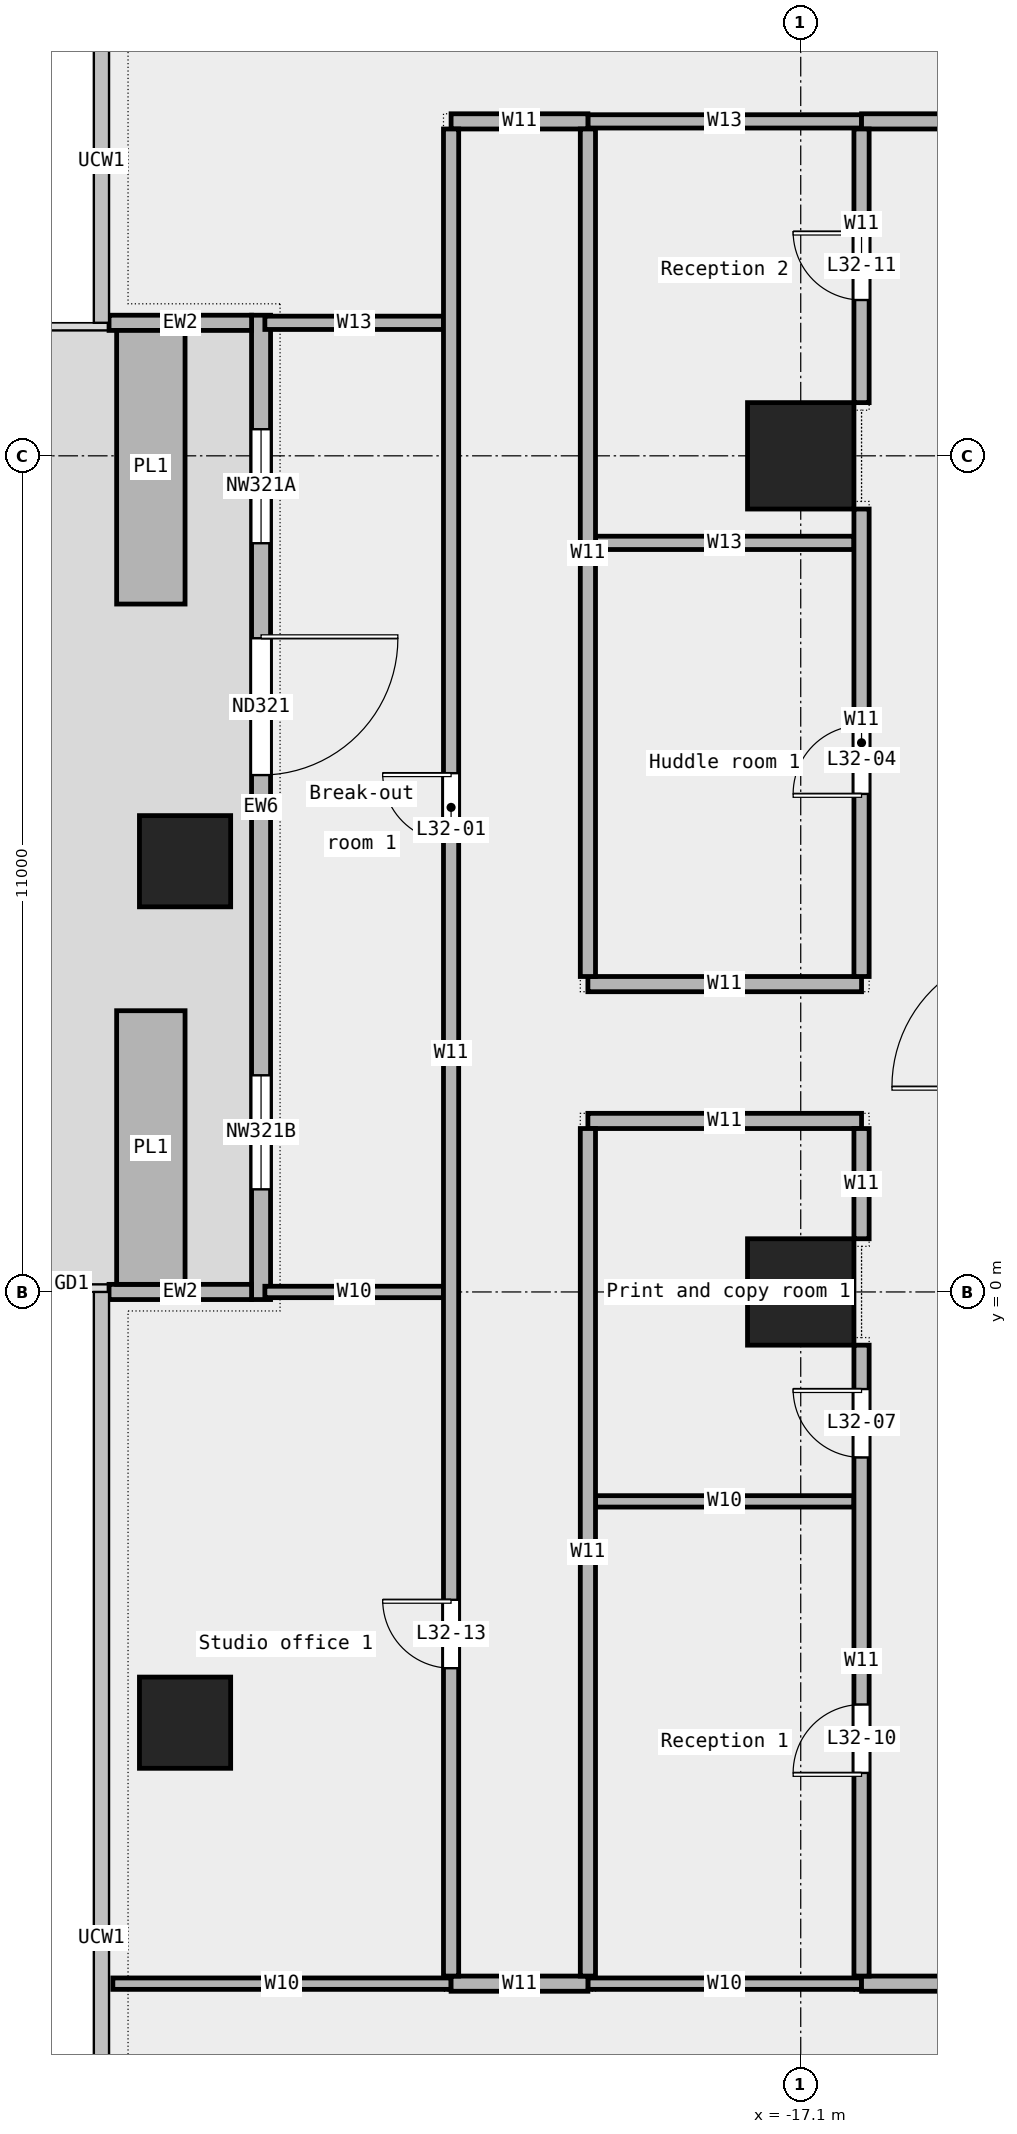
"""IFC4 building model, lengths in metres.
Left out: names, types, materials, properties, quantities, classifications, styles, units other than length and angle.
Written with IfcOpenShell. Run it as: python <this file> out.ifc"""

import sys

from ifc_helpers import new_model, si_unit, direction, frame, frame_2d, origin, origin_2d, place, context, subcontext, project, spatial, rectangle, extrude, element, fill, save


model = new_model("IFC4")
c1 = context("Model", 3, precision=1e-05, world=origin(), true_north=direction((0.0, 1.0)))
c2 = subcontext(c1, "Body", "Model", "MODEL_VIEW")
j1 = project(units=[si_unit("LENGTHUNIT", "METRE"), si_unit("PLANEANGLEUNIT", "RADIAN")], contexts=[c1])
p1 = place(None, origin())
s1 = spatial("IfcSite", under=j1, at=p1, CompositionType="ELEMENT")
p2 = place(p1, origin())
s2 = spatial("IfcBuilding", under=s1, at=p2, CompositionType="ELEMENT")
p3 = place(p2, frame((0.0, 0.0, 161.0)))
s3 = spatial("IfcBuildingStorey", under=s2, at=p3, CompositionType="ELEMENT", Elevation=161.0)
for number, where, z_axis, x_axis in (
    (1, (-25.2, 5.667, 0.0), (0.0, 0.0, 1.0), (1.0, 0.0, 0.0)),
    (2, (-25.2, -5.667, 0.0), (0.0, 0.0, 1.0), (1.0, 0.0, 0.0)),
):
    element("IfcColumn", number, at=place(p3, frame(where, z_axis=z_axis, x_axis=x_axis)), inside=s3, PredefinedType="COLUMN", context=c2, shape_type="SweptSolid", body=[
        extrude(rectangle(XDim=1.2, YDim=1.2, at=origin_2d()), origin(), (0.0, 0.0, 1.0), 3.6),
    ])
for number, where, z_axis, x_axis in (
    (3, (-17.1, 0.0, 0.0), (0.0, 0.0, 1.0), (1.0, 0.0, 0.0)),
    (4, (-17.1, 11.0, 0.0), (0.0, 0.0, 1.0), (1.0, 0.0, 0.0)),
):
    element("IfcColumn", number, at=place(p3, frame(where, z_axis=z_axis, x_axis=x_axis)), inside=s3, PredefinedType="COLUMN", context=c2, shape_type="SweptSolid", body=[
        extrude(rectangle(XDim=1.4, YDim=1.4, at=origin_2d()), origin(), (0.0, 0.0, 1.0), 3.6),
    ])
p4 = place(p3, frame((-24.2, 12.85, 0.0), z_axis=(0.0, 0.0, 1.0), x_axis=(0.0, -1.0, 0.0)))
e5 = element("IfcWall", 5, at=p4, inside=s3, PredefinedType="STANDARD", context=c2, shape_type="SweptSolid", body=[
    extrude(rectangle(XDim=12.95, YDim=0.25, at=frame_2d((6.475, 0.0))), origin(), (0.0, 0.0, 1.0), 3.6),
])
p5 = place(p4, frame((1.5, 0.0, 0.45)))
e6 = element("IfcOpeningElement", 6, at=p5, cuts=e5, PredefinedType="OPENING", context=c2, shape_type="SweptSolid", body=[
    extrude(rectangle(XDim=1.5, YDim=2.4, at=frame_2d((0.75, 1.2))), frame((0.0, 0.137, 0.0), z_axis=(0.0, -1.0, 0.0), x_axis=(1.0, 0.0, 0.0)), (0.0, 0.0, 1.0), 0.274),
])
p6 = place(p4, frame((4.25, 0.0, 0.0)))
e7 = element("IfcOpeningElement", 7, at=p6, cuts=e5, PredefinedType="OPENING", context=c2, shape_type="SweptSolid", body=[
    extrude(rectangle(XDim=1.8, YDim=2.4, at=frame_2d((0.9, 1.2))), frame((0.0, 0.137, 0.0), z_axis=(0.0, -1.0, 0.0), x_axis=(1.0, 0.0, 0.0)), (0.0, 0.0, 1.0), 0.274),
])
p7 = place(p4, frame((10.0, 0.0, 0.45)))
e8 = element("IfcOpeningElement", 8, at=p7, cuts=e5, PredefinedType="OPENING", context=c2, shape_type="SweptSolid", body=[
    extrude(rectangle(XDim=1.5, YDim=2.4, at=frame_2d((0.75, 1.2))), frame((0.0, 0.137, 0.0), z_axis=(0.0, -1.0, 0.0), x_axis=(1.0, 0.0, 0.0)), (0.0, 0.0, 1.0), 0.274),
])
for number, where, z_axis, x_axis in (
    (9, (-26.2, 12.75, 0.0), (0.0, 0.0, 1.0), (1.0, 0.0, 0.0)),
    (10, (-26.2, 0.0, 0.0), (0.0, 0.0, 1.0), (1.0, 0.0, 0.0)),
):
    element("IfcWall", number, at=place(p3, frame(where, z_axis=z_axis, x_axis=x_axis)), inside=s3, PredefinedType="STANDARD", context=c2, shape_type="SweptSolid", body=[
        extrude(rectangle(XDim=1.875, YDim=0.2, at=frame_2d((0.938, 0.0))), origin(), (0.0, 0.0, 1.0), 3.6),
    ])
for number, where, z_axis, x_axis in (
    (11, (-25.65, 12.65, 0.0), (0.0, 0.0, 1.0), (0.0, -1.0, 0.0)),
    (12, (-25.65, 3.7, 0.0), (0.0, 0.0, 1.0), (0.0, -1.0, 0.0)),
):
    element("IfcWall", number, at=place(p3, frame(where, z_axis=z_axis, x_axis=x_axis)), inside=s3, PredefinedType="STANDARD", context=c2, shape_type="SweptSolid", body=[
        extrude(rectangle(XDim=3.6, YDim=0.9, at=frame_2d((1.8, 0.0))), origin(), (0.0, 0.0, 1.0), 0.7),
    ])
p8 = place(p3, frame((-26.15, -9.1, 0.0), z_axis=(0.0, 0.0, 1.0), x_axis=(1.0, 0.0, 0.0)))
e13 = element("IfcWall", 13, at=p8, inside=s3, PredefinedType="PARTITIONING", context=c2, shape_type="SweptSolid", body=[
    extrude(rectangle(XDim=4.45, YDim=0.15, at=frame_2d((2.225, 0.0))), origin(), (0.0, 0.0, 1.0), 3.6),
])
p9 = place(p3, frame((-19.9, -9.1, 0.0), z_axis=(0.0, 0.0, 1.0), x_axis=(1.0, 0.0, 0.0)))
e14 = element("IfcWall", 14, at=p9, inside=s3, PredefinedType="PARTITIONING", context=c2, shape_type="SweptSolid", body=[
    extrude(rectangle(XDim=3.6, YDim=0.15, at=frame_2d((1.8, 0.0))), origin(), (0.0, 0.0, 1.0), 3.6),
])
p10 = place(p3, frame((-21.7, -9.1, 0.0), z_axis=(0.0, 0.0, 1.0), x_axis=(1.0, 0.0, 0.0)))
e15 = element("IfcWall", 15, at=p10, inside=s3, PredefinedType="PARTITIONING", context=c2, shape_type="SweptSolid", body=[
    extrude(rectangle(XDim=1.8, YDim=0.2, at=frame_2d((0.9, 0.0))), origin(), (0.0, 0.0, 1.0), 3.6),
])
p11 = place(p3, frame((-16.3, -9.1, 0.0), z_axis=(0.0, 0.0, 1.0), x_axis=(1.0, 0.0, 0.0)))
e16 = element("IfcWall", 16, at=p11, inside=s3, PredefinedType="PARTITIONING", context=c2, shape_type="SweptSolid", body=[
    extrude(rectangle(XDim=5.02, YDim=0.2, at=frame_2d((2.51, 0.0))), origin(), (0.0, 0.0, 1.0), 3.6),
])
p12 = place(p3, frame((-19.8, -2.755, 0.0), z_axis=(0.0, 0.0, 1.0), x_axis=(1.0, 0.0, 0.0)))
e17 = element("IfcWall", 17, at=p12, inside=s3, PredefinedType="PARTITIONING", context=c2, shape_type="SweptSolid", body=[
    extrude(rectangle(XDim=3.4, YDim=0.15, at=frame_2d((1.7, 0.0))), origin(), (0.0, 0.0, 1.0), 3.6),
])
p13 = place(p3, frame((-24.15, 0.0, 0.0), z_axis=(0.0, 0.0, 1.0), x_axis=(1.0, 0.0, 0.0)))
e18 = element("IfcWall", 18, at=p13, inside=s3, PredefinedType="PARTITIONING", context=c2, shape_type="SweptSolid", body=[
    extrude(rectangle(XDim=2.35, YDim=0.15, at=frame_2d((1.175, 0.0))), origin(), (0.0, 0.0, 1.0), 3.6),
])
for number, where, z_axis, x_axis in (
    (19, (-19.9, 2.25, 0.0), (0.0, 0.0, 1.0), (1.0, 0.0, 0.0)),
    (20, (-19.9, 4.05, 0.0), (0.0, 0.0, 1.0), (1.0, 0.0, 0.0)),
):
    element("IfcWall", number, at=place(p3, frame(where, z_axis=z_axis, x_axis=x_axis)), inside=s3, PredefinedType="PARTITIONING", context=c2, shape_type="SweptSolid", body=[
        extrude(rectangle(XDim=3.6, YDim=0.2, at=frame_2d((1.8, 0.0))), origin(), (0.0, 0.0, 1.0), 3.6),
    ])
p14 = place(p3, frame((-19.8, 9.855, 0.0), z_axis=(0.0, 0.0, 1.0), x_axis=(1.0, 0.0, 0.0)))
e21 = element("IfcWall", 21, at=p14, inside=s3, PredefinedType="PARTITIONING", context=c2, shape_type="SweptSolid", body=[
    extrude(rectangle(XDim=3.4, YDim=0.175, at=frame_2d((1.7, 0.0))), origin(), (0.0, 0.0, 1.0), 3.6),
])
p15 = place(p3, frame((-24.15, 12.75, 0.0), z_axis=(0.0, 0.0, 1.0), x_axis=(1.0, 0.0, 0.0)))
e22 = element("IfcWall", 22, at=p15, inside=s3, PredefinedType="PARTITIONING", context=c2, shape_type="SweptSolid", body=[
    extrude(rectangle(XDim=2.35, YDim=0.175, at=frame_2d((1.175, 0.0))), origin(), (0.0, 0.0, 1.0), 3.6),
])
p16 = place(p3, frame((-19.9, 15.4, 0.0), z_axis=(0.0, 0.0, 1.0), x_axis=(1.0, 0.0, 0.0)))
e23 = element("IfcWall", 23, at=p16, inside=s3, PredefinedType="PARTITIONING", context=c2, shape_type="SweptSolid", body=[
    extrude(rectangle(XDim=3.6, YDim=0.175, at=frame_2d((1.8, 0.0))), origin(), (0.0, 0.0, 1.0), 3.6),
])
p17 = place(p3, frame((-21.7, 15.4, 0.0), z_axis=(0.0, 0.0, 1.0), x_axis=(1.0, 0.0, 0.0)))
e24 = element("IfcWall", 24, at=p17, inside=s3, PredefinedType="PARTITIONING", context=c2, shape_type="SweptSolid", body=[
    extrude(rectangle(XDim=1.8, YDim=0.2, at=frame_2d((0.9, 0.0))), origin(), (0.0, 0.0, 1.0), 3.6),
])
p18 = place(p3, frame((-16.3, 15.4, 0.0), z_axis=(0.0, 0.0, 1.0), x_axis=(1.0, 0.0, 0.0)))
e25 = element("IfcWall", 25, at=p18, inside=s3, PredefinedType="PARTITIONING", context=c2, shape_type="SweptSolid", body=[
    extrude(rectangle(XDim=32.6, YDim=0.2, at=frame_2d((16.3, 0.0))), origin(), (0.0, 0.0, 1.0), 3.6),
])
p19 = place(p18, frame((24.992, 0.0, 0.0)))
e26 = element("IfcOpeningElement", 26, at=p19, cuts=e25, PredefinedType="OPENING", context=c2, shape_type="SweptSolid", body=[
    extrude(rectangle(XDim=1.8, YDim=2.1, at=frame_2d((0.9, 1.05))), frame((0.0, 0.112, 0.0), z_axis=(0.0, -1.0, 0.0), x_axis=(1.0, 0.0, 0.0)), (0.0, 0.0, 1.0), 0.224),
])
p20 = place(p18, frame((9.635, 0.0, 0.0)))
e27 = element("IfcOpeningElement", 27, at=p20, cuts=e25, PredefinedType="OPENING", context=c2, shape_type="SweptSolid", body=[
    extrude(rectangle(XDim=1.8, YDim=2.1, at=frame_2d((0.9, 1.05))), frame((0.0, 0.112, 0.0), z_axis=(0.0, -1.0, 0.0), x_axis=(1.0, 0.0, 0.0)), (0.0, 0.0, 1.0), 0.224),
])
p21 = place(p3, frame((-21.7, -9.0, 0.0), z_axis=(0.0, 0.0, 1.0), x_axis=(0.0, 1.0, 0.0)))
e28 = element("IfcWall", 28, at=p21, inside=s3, PredefinedType="PARTITIONING", context=c2, shape_type="SweptSolid", body=[
    extrude(rectangle(XDim=24.3, YDim=0.2, at=frame_2d((12.15, 0.0))), origin(), (0.0, 0.0, 1.0), 3.6),
])
p22 = place(p21, frame((14.925, 0.0, 0.0)))
e29 = element("IfcOpeningElement", 29, at=p22, cuts=e28, PredefinedType="OPENING", context=c2, shape_type="SweptSolid", body=[
    extrude(rectangle(XDim=0.9, YDim=2.1, at=frame_2d((0.45, 1.05))), frame((0.0, 0.112, 0.0), z_axis=(0.0, -1.0, 0.0), x_axis=(1.0, 0.0, 0.0)), (0.0, 0.0, 1.0), 0.224),
])
p23 = place(p21, frame((4.05, 0.0, 0.0)))
e30 = element("IfcOpeningElement", 30, at=p23, cuts=e28, PredefinedType="OPENING", context=c2, shape_type="SweptSolid", body=[
    extrude(rectangle(XDim=0.9, YDim=2.1, at=frame_2d((0.45, 1.05))), frame((0.0, 0.112, 0.0), z_axis=(0.0, -1.0, 0.0), x_axis=(1.0, 0.0, 0.0)), (0.0, 0.0, 1.0), 0.224),
])
p24 = place(p3, frame((-19.9, -9.0, 0.0), z_axis=(0.0, 0.0, 1.0), x_axis=(0.0, 1.0, 0.0)))
e31 = element("IfcWall", 31, at=p24, inside=s3, PredefinedType="PARTITIONING", context=c2, shape_type="SweptSolid", body=[
    extrude(rectangle(XDim=11.15, YDim=0.2, at=frame_2d((5.575, 0.0))), origin(), (0.0, 0.0, 1.0), 3.6),
])
p25 = place(p3, frame((-19.9, 4.15, 0.0), z_axis=(0.0, 0.0, 1.0), x_axis=(0.0, 1.0, 0.0)))
e32 = element("IfcWall", 32, at=p25, inside=s3, PredefinedType="PARTITIONING", context=c2, shape_type="SweptSolid", body=[
    extrude(rectangle(XDim=11.15, YDim=0.2, at=frame_2d((5.575, 0.0))), origin(), (0.0, 0.0, 1.0), 3.6),
])
p26 = place(p3, frame((-16.3, -9.0, 0.0), z_axis=(0.0, 0.0, 1.0), x_axis=(0.0, 1.0, 0.0)))
e33 = element("IfcWall", 33, at=p26, inside=s3, PredefinedType="PARTITIONING", context=c2, shape_type="SweptSolid", body=[
    extrude(rectangle(XDim=8.3, YDim=0.2, at=frame_2d((4.15, 0.0))), origin(), (0.0, 0.0, 1.0), 3.6),
])
p27 = place(p26, frame((6.823, 0.0, 0.0)))
e34 = element("IfcOpeningElement", 34, at=p27, cuts=e33, PredefinedType="OPENING", context=c2, shape_type="SweptSolid", body=[
    extrude(rectangle(XDim=0.9, YDim=2.1, at=frame_2d((0.45, 1.05))), frame((0.0, 0.112, 0.0), z_axis=(0.0, -1.0, 0.0), x_axis=(1.0, 0.0, 0.0)), (0.0, 0.0, 1.0), 0.224),
])
p28 = place(p26, frame((2.673, 0.0, 0.0)))
e35 = element("IfcOpeningElement", 35, at=p28, cuts=e33, PredefinedType="OPENING", context=c2, shape_type="SweptSolid", body=[
    extrude(rectangle(XDim=0.9, YDim=2.1, at=frame_2d((0.45, 1.05))), frame((0.0, 0.112, 0.0), z_axis=(0.0, -1.0, 0.0), x_axis=(1.0, 0.0, 0.0)), (0.0, 0.0, 1.0), 0.224),
])
p29 = place(p3, frame((-16.3, 0.7, 0.0), z_axis=(0.0, 0.0, 1.0), x_axis=(0.0, 1.0, 0.0)))
e36 = element("IfcWall", 36, at=p29, inside=s3, PredefinedType="PARTITIONING", context=c2, shape_type="SweptSolid", body=[
    extrude(rectangle(XDim=1.45, YDim=0.2, at=frame_2d((0.725, 0.0))), origin(), (0.0, 0.0, 1.0), 3.6),
])
p30 = place(p3, frame((-16.3, 4.15, 0.0), z_axis=(0.0, 0.0, 1.0), x_axis=(0.0, 1.0, 0.0)))
e37 = element("IfcWall", 37, at=p30, inside=s3, PredefinedType="PARTITIONING", context=c2, shape_type="SweptSolid", body=[
    extrude(rectangle(XDim=6.15, YDim=0.2, at=frame_2d((3.075, 0.0))), origin(), (0.0, 0.0, 1.0), 3.6),
])
p31 = place(p30, frame((2.403, 0.0, 0.0)))
e38 = element("IfcOpeningElement", 38, at=p31, cuts=e37, PredefinedType="OPENING", context=c2, shape_type="SweptSolid", body=[
    extrude(rectangle(XDim=0.9, YDim=2.1, at=frame_2d((0.45, 1.05))), frame((0.0, 0.112, 0.0), z_axis=(0.0, -1.0, 0.0), x_axis=(1.0, 0.0, 0.0)), (0.0, 0.0, 1.0), 0.224),
])
p32 = place(p3, frame((-16.3, 11.7, 0.0), z_axis=(0.0, 0.0, 1.0), x_axis=(0.0, 1.0, 0.0)))
e39 = element("IfcWall", 39, at=p32, inside=s3, PredefinedType="PARTITIONING", context=c2, shape_type="SweptSolid", body=[
    extrude(rectangle(XDim=3.6, YDim=0.2, at=frame_2d((1.8, 0.0))), origin(), (0.0, 0.0, 1.0), 3.6),
])
p33 = place(p32, frame((1.35, 0.0, 0.0)))
e40 = element("IfcOpeningElement", 40, at=p33, cuts=e39, PredefinedType="OPENING", context=c2, shape_type="SweptSolid", body=[
    extrude(rectangle(XDim=0.9, YDim=2.1, at=frame_2d((0.45, 1.05))), frame((0.0, 0.112, 0.0), z_axis=(0.0, -1.0, 0.0), x_axis=(1.0, 0.0, 0.0)), (0.0, 0.0, 1.0), 0.224),
])
p34 = place(p5, origin())
e41 = element("IfcWindow", 41, at=p34, inside=s3, PartitioningType="SINGLE_PANEL", PredefinedType="WINDOW", context=c2, shape_type="SweptSolid", body=[
    extrude(rectangle(XDim=1.5, YDim=2.4, at=frame_2d((0.75, 1.2))), frame((0.0, 0.03, 0.0), z_axis=(0.0, -1.0, 0.0), x_axis=(1.0, 0.0, 0.0)), (0.0, 0.0, 1.0), 0.06),
])
fill(e6, e41)
p35 = place(p6, origin())
e42 = element("IfcDoor", 42, at=p35, inside=s3, OperationType="DOUBLE_DOOR_SINGLE_SWING", PredefinedType="DOOR", context=c2, shape_type="SweptSolid", body=[
    extrude(rectangle(XDim=1.8, YDim=2.4, at=frame_2d((0.9, 1.2))), frame((0.0, 0.025, 0.0), z_axis=(0.0, -1.0, 0.0), x_axis=(1.0, 0.0, 0.0)), (0.0, 0.0, 1.0), 0.05),
])
fill(e7, e42)
p36 = place(p7, origin())
e43 = element("IfcWindow", 43, at=p36, inside=s3, PartitioningType="SINGLE_PANEL", PredefinedType="WINDOW", context=c2, shape_type="SweptSolid", body=[
    extrude(rectangle(XDim=1.5, YDim=2.4, at=frame_2d((0.75, 1.2))), frame((0.0, 0.03, 0.0), z_axis=(0.0, -1.0, 0.0), x_axis=(1.0, 0.0, 0.0)), (0.0, 0.0, 1.0), 0.06),
])
fill(e8, e43)
p37 = place(p22, origin())
e44 = element("IfcDoor", 44, at=p37, inside=s3, OperationType="SINGLE_SWING_RIGHT", PredefinedType="DOOR", context=c2, shape_type="SweptSolid", body=[
    extrude(rectangle(XDim=0.9, YDim=2.1, at=frame_2d((0.45, 1.05))), frame((0.0, 0.025, 0.0), z_axis=(0.0, -1.0, 0.0), x_axis=(1.0, 0.0, 0.0)), (0.0, 0.0, 1.0), 0.05),
])
fill(e29, e44)
p38 = place(p31, origin())
e45 = element("IfcDoor", 45, at=p38, inside=s3, OperationType="SINGLE_SWING_LEFT", PredefinedType="DOOR", context=c2, shape_type="SweptSolid", body=[
    extrude(rectangle(XDim=0.9, YDim=2.1, at=frame_2d((0.45, 1.05))), frame((0.0, 0.025, 0.0), z_axis=(0.0, -1.0, 0.0), x_axis=(1.0, 0.0, 0.0)), (0.0, 0.0, 1.0), 0.05),
])
fill(e38, e45)
p39 = place(p27, origin())
e46 = element("IfcDoor", 46, at=p39, inside=s3, OperationType="SINGLE_SWING_RIGHT", PredefinedType="DOOR", context=c2, shape_type="SweptSolid", body=[
    extrude(rectangle(XDim=0.9, YDim=2.1, at=frame_2d((0.45, 1.05))), frame((0.0, 0.025, 0.0), z_axis=(0.0, -1.0, 0.0), x_axis=(1.0, 0.0, 0.0)), (0.0, 0.0, 1.0), 0.05),
])
fill(e34, e46)
p40 = place(p28, origin())
e47 = element("IfcDoor", 47, at=p40, inside=s3, OperationType="SINGLE_SWING_LEFT", PredefinedType="DOOR", context=c2, shape_type="SweptSolid", body=[
    extrude(rectangle(XDim=0.9, YDim=2.1, at=frame_2d((0.45, 1.05))), frame((0.0, 0.025, 0.0), z_axis=(0.0, -1.0, 0.0), x_axis=(1.0, 0.0, 0.0)), (0.0, 0.0, 1.0), 0.05),
])
fill(e35, e47)
p41 = place(p33, origin())
e48 = element("IfcDoor", 48, at=p41, inside=s3, OperationType="SINGLE_SWING_RIGHT", PredefinedType="DOOR", context=c2, shape_type="SweptSolid", body=[
    extrude(rectangle(XDim=0.9, YDim=2.1, at=frame_2d((0.45, 1.05))), frame((0.0, 0.025, 0.0), z_axis=(0.0, -1.0, 0.0), x_axis=(1.0, 0.0, 0.0)), (0.0, 0.0, 1.0), 0.05),
])
fill(e40, e48)
p42 = place(p23, origin())
e49 = element("IfcDoor", 49, at=p42, inside=s3, OperationType="SINGLE_SWING_RIGHT", PredefinedType="DOOR", context=c2, shape_type="SweptSolid", body=[
    extrude(rectangle(XDim=0.9, YDim=2.1, at=frame_2d((0.45, 1.05))), frame((0.0, 0.025, 0.0), z_axis=(0.0, -1.0, 0.0), x_axis=(1.0, 0.0, 0.0)), (0.0, 0.0, 1.0), 0.05),
])
fill(e30, e49)
save(model, sys.argv[1])
